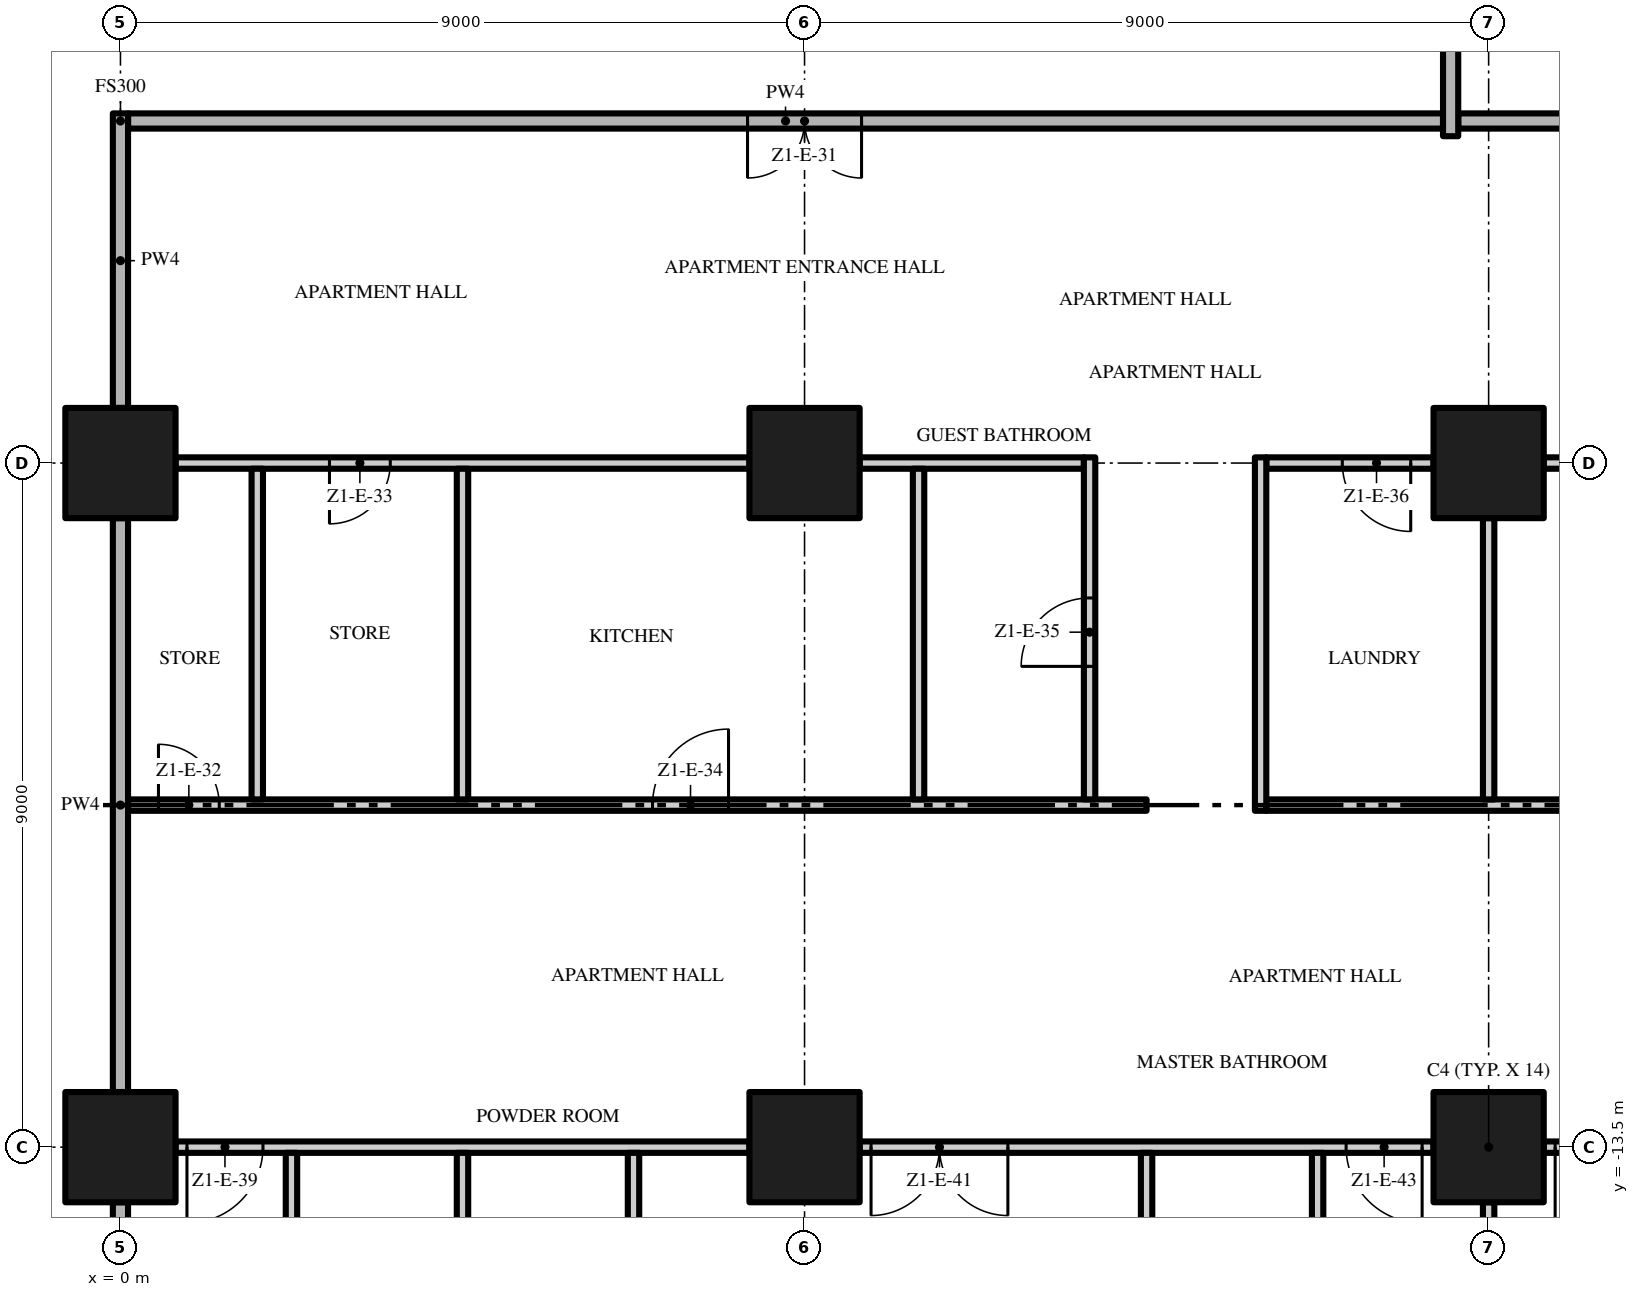
"""IFC4 building model, lengths in metres.
Left out: names, types, materials, properties, quantities, classifications, styles, units other than length and angle.
Written with IfcOpenShell. Run it as: python <this file> out.ifc"""

import sys

from ifc_helpers import new_model, si_unit, direction, frame, frame_2d, origin, origin_2d, place, context, subcontext, project, spatial, rectangle, extrude, element, fill, save


model = new_model("IFC4")
c1 = context("Model", 3, precision=1e-05, world=origin(), true_north=direction((0.0, 1.0)))
c2 = subcontext(c1, "Body", "Model", "MODEL_VIEW")
j1 = project(units=[si_unit("LENGTHUNIT", "METRE"), si_unit("PLANEANGLEUNIT", "RADIAN")], contexts=[c1])
p1 = place(None, origin())
s1 = spatial("IfcSite", under=j1, at=p1, CompositionType="ELEMENT")
p2 = place(p1, origin())
s2 = spatial("IfcBuilding", under=s1, at=p2, CompositionType="ELEMENT")
p3 = place(p2, frame((0.0, 0.0, 60.6)))
s3 = spatial("IfcBuildingStorey", under=s2, at=p3, CompositionType="ELEMENT", Elevation=60.6)
for number, where, z_axis, x_axis in (
    (1, (0.0, -13.5, 0.0), (0.0, 0.0, 1.0), (1.0, 0.0, 0.0)),
    (2, (0.0, -4.5, 0.0), (0.0, 0.0, 1.0), (1.0, 0.0, 0.0)),
    (3, (18.0, -13.5, 0.0), (0.0, 0.0, 1.0), (1.0, 0.0, 0.0)),
    (4, (18.0, -4.5, 0.0), (0.0, 0.0, 1.0), (1.0, 0.0, 0.0)),
    (5, (9.0, -13.5, 0.0), (0.0, 0.0, 1.0), (1.0, 0.0, 0.0)),
    (6, (9.0, -4.5, 0.0), (0.0, 0.0, 1.0), (1.0, 0.0, 0.0)),
):
    element("IfcColumn", number, at=place(p3, frame(where, z_axis=z_axis, x_axis=x_axis)), inside=s3, PredefinedType="COLUMN", context=c2, shape_type="SweptSolid", body=[
        extrude(rectangle(XDim=1.45, YDim=1.45, at=origin_2d()), origin(), (0.0, 0.0, 1.0), 3.5),
    ])
p4 = place(p3, frame((8.275, -13.5, 0.0), z_axis=(0.0, 0.0, 1.0), x_axis=(-1.0, 0.0, 0.0)))
e7 = element("IfcWall", 7, at=p4, inside=s3, PredefinedType="PARTITIONING", context=c2, shape_type="SweptSolid", body=[
    extrude(rectangle(XDim=7.55, YDim=0.15, at=frame_2d((3.775, 0.0))), origin(), (0.0, 0.0, 1.0), 3.5),
])
p5 = place(p4, frame((6.4, 0.0, 0.0)))
e8 = element("IfcOpeningElement", 8, at=p5, cuts=e7, PredefinedType="OPENING", context=c2, shape_type="SweptSolid", body=[
    extrude(rectangle(XDim=1.0, YDim=2.4, at=frame_2d((0.5, 1.2))), frame((0.0, 0.085, 0.0), z_axis=(0.0, -1.0, 0.0), x_axis=(1.0, 0.0, 0.0)), (0.0, 0.0, 1.0), 0.17),
])
p6 = place(p3, frame((17.275, -13.5, 0.0), z_axis=(0.0, 0.0, 1.0), x_axis=(-1.0, 0.0, 0.0)))
e9 = element("IfcWall", 9, at=p6, inside=s3, PredefinedType="PARTITIONING", context=c2, shape_type="SweptSolid", body=[
    extrude(rectangle(XDim=7.55, YDim=0.15, at=frame_2d((3.775, 0.0))), origin(), (0.0, 0.0, 1.0), 3.5),
])
p7 = place(p6, frame((5.6, 0.0, 0.0)))
e10 = element("IfcOpeningElement", 10, at=p7, cuts=e9, PredefinedType="OPENING", context=c2, shape_type="SweptSolid", body=[
    extrude(rectangle(XDim=1.8, YDim=2.4, at=frame_2d((0.9, 1.2))), frame((0.0, 0.085, 0.0), z_axis=(0.0, -1.0, 0.0), x_axis=(1.0, 0.0, 0.0)), (0.0, 0.0, 1.0), 0.17),
])
p8 = place(p6, frame((0.15, 0.0, 0.0)))
e11 = element("IfcOpeningElement", 11, at=p8, cuts=e9, PredefinedType="OPENING", context=c2, shape_type="SweptSolid", body=[
    extrude(rectangle(XDim=1.0, YDim=2.4, at=frame_2d((0.5, 1.2))), frame((0.0, 0.085, 0.0), z_axis=(0.0, -1.0, 0.0), x_axis=(1.0, 0.0, 0.0)), (0.0, 0.0, 1.0), 0.17),
])
p9 = place(p3, frame((25.65, -13.5, 0.0), z_axis=(0.0, 0.0, 1.0), x_axis=(-1.0, 0.0, 0.0)))
e12 = element("IfcWall", 12, at=p9, inside=s3, PredefinedType="PARTITIONING", context=c2, shape_type="SweptSolid", body=[
    extrude(rectangle(XDim=6.925, YDim=0.15, at=frame_2d((3.462, 0.0))), origin(), (0.0, 0.0, 1.0), 3.5),
])
p10 = place(p9, frame((5.775, 0.0, 0.0)))
e13 = element("IfcOpeningElement", 13, at=p10, cuts=e12, PredefinedType="OPENING", context=c2, shape_type="SweptSolid", body=[
    extrude(rectangle(XDim=1.0, YDim=2.4, at=frame_2d((0.5, 1.2))), frame((0.0, 0.085, 0.0), z_axis=(0.0, -1.0, 0.0), x_axis=(1.0, 0.0, 0.0)), (0.0, 0.0, 1.0), 0.17),
])
p11 = place(p9, frame((0.4, 0.0, 0.0)))
e14 = element("IfcOpeningElement", 14, at=p11, cuts=e12, PredefinedType="OPENING", context=c2, shape_type="SweptSolid", body=[
    extrude(rectangle(XDim=1.0, YDim=2.4, at=frame_2d((0.5, 1.2))), frame((0.0, 0.085, 0.0), z_axis=(0.0, -1.0, 0.0), x_axis=(1.0, 0.0, 0.0)), (0.0, 0.0, 1.0), 0.17),
])
p12 = place(p3, frame((0.1, -9.0, 0.0), z_axis=(0.0, 0.0, 1.0), x_axis=(1.0, 0.0, 0.0)))
e15 = element("IfcWall", 15, at=p12, inside=s3, PredefinedType="PARTITIONING", context=c2, shape_type="SweptSolid", body=[
    extrude(rectangle(XDim=13.4, YDim=0.15, at=frame_2d((6.7, 0.0))), origin(), (0.0, 0.0, 1.0), 3.5),
])
p13 = place(p12, frame((0.4, 0.0, 0.0)))
e16 = element("IfcOpeningElement", 16, at=p13, cuts=e15, PredefinedType="OPENING", context=c2, shape_type="SweptSolid", body=[
    extrude(rectangle(XDim=0.8, YDim=2.0, at=frame_2d((0.4, 1.0))), frame((0.0, 0.085, 0.0), z_axis=(0.0, -1.0, 0.0), x_axis=(1.0, 0.0, 0.0)), (0.0, 0.0, 1.0), 0.17),
])
p14 = place(p12, frame((6.9, 0.0, 0.0)))
e17 = element("IfcOpeningElement", 17, at=p14, cuts=e15, PredefinedType="OPENING", context=c2, shape_type="SweptSolid", body=[
    extrude(rectangle(XDim=1.0, YDim=2.4, at=frame_2d((0.5, 1.2))), frame((0.0, 0.085, 0.0), z_axis=(0.0, -1.0, 0.0), x_axis=(1.0, 0.0, 0.0)), (0.0, 0.0, 1.0), 0.17),
])
p15 = place(p3, frame((15.075, -9.0, 0.0), z_axis=(0.0, 0.0, 1.0), x_axis=(1.0, 0.0, 0.0)))
e18 = element("IfcWall", 18, at=p15, inside=s3, PredefinedType="PARTITIONING", context=c2, shape_type="SweptSolid", body=[
    extrude(rectangle(XDim=11.625, YDim=0.15, at=frame_2d((5.812, 0.0))), origin(), (0.0, 0.0, 1.0), 3.5),
])
p16 = place(p3, frame((8.275, -4.5, 0.0), z_axis=(0.0, 0.0, 1.0), x_axis=(-1.0, 0.0, 0.0)))
e19 = element("IfcWall", 19, at=p16, inside=s3, PredefinedType="PARTITIONING", context=c2, shape_type="SweptSolid", body=[
    extrude(rectangle(XDim=7.55, YDim=0.15, at=frame_2d((3.775, 0.0))), origin(), (0.0, 0.0, 1.0), 3.5),
])
p17 = place(p16, frame((4.725, 0.0, 0.0)))
e20 = element("IfcOpeningElement", 20, at=p17, cuts=e19, PredefinedType="OPENING", context=c2, shape_type="SweptSolid", body=[
    extrude(rectangle(XDim=0.8, YDim=2.0, at=frame_2d((0.4, 1.0))), frame((0.0, 0.085, 0.0), z_axis=(0.0, -1.0, 0.0), x_axis=(1.0, 0.0, 0.0)), (0.0, 0.0, 1.0), 0.17),
])
p18 = place(p3, frame((9.725, -4.5, 0.0), z_axis=(0.0, 0.0, 1.0), x_axis=(1.0, 0.0, 0.0)))
e21 = element("IfcWall", 21, at=p18, inside=s3, PredefinedType="PARTITIONING", context=c2, shape_type="SweptSolid", body=[
    extrude(rectangle(XDim=2.95, YDim=0.15, at=frame_2d((1.475, 0.0))), origin(), (0.0, 0.0, 1.0), 3.5),
])
p19 = place(p3, frame((17.275, -4.5, 0.0), z_axis=(0.0, 0.0, 1.0), x_axis=(-1.0, 0.0, 0.0)))
e22 = element("IfcWall", 22, at=p19, inside=s3, PredefinedType="PARTITIONING", context=c2, shape_type="SweptSolid", body=[
    extrude(rectangle(XDim=2.2, YDim=0.15, at=frame_2d((1.1, 0.0))), origin(), (0.0, 0.0, 1.0), 3.5),
])
p20 = place(p19, frame((0.3, 0.0, 0.0)))
e23 = element("IfcOpeningElement", 23, at=p20, cuts=e22, PredefinedType="OPENING", context=c2, shape_type="SweptSolid", body=[
    extrude(rectangle(XDim=0.9, YDim=2.1, at=frame_2d((0.45, 1.05))), frame((0.0, 0.085, 0.0), z_axis=(0.0, -1.0, 0.0), x_axis=(1.0, 0.0, 0.0)), (0.0, 0.0, 1.0), 0.17),
])
p21 = place(p3, frame((25.65, -4.5, 0.0), z_axis=(0.0, 0.0, 1.0), x_axis=(-1.0, 0.0, 0.0)))
e24 = element("IfcWall", 24, at=p21, inside=s3, PredefinedType="PARTITIONING", context=c2, shape_type="SweptSolid", body=[
    extrude(rectangle(XDim=6.925, YDim=0.15, at=frame_2d((3.462, 0.0))), origin(), (0.0, 0.0, 1.0), 3.5),
])
p22 = place(p21, frame((4.575, 0.0, 0.0)))
e25 = element("IfcOpeningElement", 25, at=p22, cuts=e24, PredefinedType="OPENING", context=c2, shape_type="SweptSolid", body=[
    extrude(rectangle(XDim=0.9, YDim=2.1, at=frame_2d((0.45, 1.05))), frame((0.0, 0.085, 0.0), z_axis=(0.0, -1.0, 0.0), x_axis=(1.0, 0.0, 0.0)), (0.0, 0.0, 1.0), 0.17),
])
p23 = place(p3, frame((17.4, 0.0, 0.0), z_axis=(0.0, 0.0, 1.0), x_axis=(-1.0, 0.0, 0.0)))
e26 = element("IfcWall", 26, at=p23, inside=s3, PredefinedType="PARTITIONING", context=c2, shape_type="SweptSolid", body=[
    extrude(rectangle(XDim=17.3, YDim=0.2, at=frame_2d((8.65, 0.0))), origin(), (0.0, 0.0, 1.0), 3.5),
])
p24 = place(p23, frame((7.65, 0.0, 0.0)))
e27 = element("IfcOpeningElement", 27, at=p24, cuts=e26, PredefinedType="OPENING", context=c2, shape_type="SweptSolid", body=[
    extrude(rectangle(XDim=1.5, YDim=2.4, at=frame_2d((0.75, 1.2))), frame((0.0, 0.11, 0.0), z_axis=(0.0, -1.0, 0.0), x_axis=(1.0, 0.0, 0.0)), (0.0, 0.0, 1.0), 0.22),
])
p25 = place(p3, frame((17.6, 0.0, 0.0), z_axis=(0.0, 0.0, 1.0), x_axis=(1.0, 0.0, 0.0)))
e28 = element("IfcWall", 28, at=p25, inside=s3, PredefinedType="PARTITIONING", context=c2, shape_type="SweptSolid", body=[
    extrude(rectangle(XDim=9.1, YDim=0.2, at=frame_2d((4.55, 0.0))), origin(), (0.0, 0.0, 1.0), 3.5),
])
p26 = place(p3, frame((0.0, -21.15, 0.0), z_axis=(0.0, 0.0, 1.0), x_axis=(0.0, 1.0, 0.0)))
e29 = element("IfcWall", 29, at=p26, inside=s3, PredefinedType="PARTITIONING", context=c2, shape_type="SweptSolid", body=[
    extrude(rectangle(XDim=6.925, YDim=0.2, at=frame_2d((3.462, 0.0))), origin(), (0.0, 0.0, 1.0), 3.5),
])
p27 = place(p3, frame((0.0, -12.775, 0.0), z_axis=(0.0, 0.0, 1.0), x_axis=(0.0, 1.0, 0.0)))
e30 = element("IfcWall", 30, at=p27, inside=s3, PredefinedType="PARTITIONING", context=c2, shape_type="SweptSolid", body=[
    extrude(rectangle(XDim=7.55, YDim=0.2, at=frame_2d((3.775, 0.0))), origin(), (0.0, 0.0, 1.0), 3.5),
])
p28 = place(p3, frame((0.0, -3.775, 0.0), z_axis=(0.0, 0.0, 1.0), x_axis=(0.0, 1.0, 0.0)))
e31 = element("IfcWall", 31, at=p28, inside=s3, PredefinedType="PARTITIONING", context=c2, shape_type="SweptSolid", body=[
    extrude(rectangle(XDim=3.875, YDim=0.2, at=frame_2d((1.938, 0.0))), origin(), (0.0, 0.0, 1.0), 3.5),
])
p29 = place(p3, frame((1.8, -8.925, 0.0), z_axis=(0.0, 0.0, 1.0), x_axis=(0.0, 1.0, 0.0)))
e32 = element("IfcWall", 32, at=p29, inside=s3, PredefinedType="PARTITIONING", context=c2, shape_type="SweptSolid", body=[
    extrude(rectangle(XDim=4.35, YDim=0.15, at=frame_2d((2.175, 0.0))), origin(), (0.0, 0.0, 1.0), 3.5),
])
p30 = place(p3, frame((2.25, -16.575, 0.0), z_axis=(0.0, 0.0, 1.0), x_axis=(0.0, 1.0, 0.0)))
e33 = element("IfcWall", 33, at=p30, inside=s3, PredefinedType="PARTITIONING", context=c2, shape_type="SweptSolid", body=[
    extrude(rectangle(XDim=3.0, YDim=0.15, at=frame_2d((1.5, 0.0))), origin(), (0.0, 0.0, 1.0), 3.5),
])
p31 = place(p3, frame((4.5, -22.2, 0.0), z_axis=(0.0, 0.0, 1.0), x_axis=(0.0, 1.0, 0.0)))
e34 = element("IfcWall", 34, at=p31, inside=s3, PredefinedType="PARTITIONING", context=c2, shape_type="SweptSolid", body=[
    extrude(rectangle(XDim=8.625, YDim=0.15, at=frame_2d((4.312, 0.0))), origin(), (0.0, 0.0, 1.0), 3.5),
])
p32 = place(p3, frame((4.5, -8.925, 0.0), z_axis=(0.0, 0.0, 1.0), x_axis=(0.0, 1.0, 0.0)))
e35 = element("IfcWall", 35, at=p32, inside=s3, PredefinedType="PARTITIONING", context=c2, shape_type="SweptSolid", body=[
    extrude(rectangle(XDim=4.35, YDim=0.15, at=frame_2d((2.175, 0.0))), origin(), (0.0, 0.0, 1.0), 3.5),
])
p33 = place(p3, frame((6.75, -16.575, 0.0), z_axis=(0.0, 0.0, 1.0), x_axis=(0.0, 1.0, 0.0)))
e36 = element("IfcWall", 36, at=p33, inside=s3, PredefinedType="PARTITIONING", context=c2, shape_type="SweptSolid", body=[
    extrude(rectangle(XDim=3.0, YDim=0.15, at=frame_2d((1.5, 0.0))), origin(), (0.0, 0.0, 1.0), 3.5),
])
p34 = place(p3, frame((10.5, -8.925, 0.0), z_axis=(0.0, 0.0, 1.0), x_axis=(0.0, 1.0, 0.0)))
e37 = element("IfcWall", 37, at=p34, inside=s3, PredefinedType="PARTITIONING", context=c2, shape_type="SweptSolid", body=[
    extrude(rectangle(XDim=4.35, YDim=0.15, at=frame_2d((2.175, 0.0))), origin(), (0.0, 0.0, 1.0), 3.5),
])
p35 = place(p3, frame((12.75, -8.925, 0.0), z_axis=(0.0, 0.0, 1.0), x_axis=(0.0, 1.0, 0.0)))
e38 = element("IfcWall", 38, at=p35, inside=s3, PredefinedType="PARTITIONING", context=c2, shape_type="SweptSolid", body=[
    extrude(rectangle(XDim=4.5, YDim=0.15, at=frame_2d((2.25, 0.0))), origin(), (0.0, 0.0, 1.0), 3.5),
])
p36 = place(p35, frame((1.75, 0.0, 0.0)))
e39 = element("IfcOpeningElement", 39, at=p36, cuts=e38, PredefinedType="OPENING", context=c2, shape_type="SweptSolid", body=[
    extrude(rectangle(XDim=0.9, YDim=2.1, at=frame_2d((0.45, 1.05))), frame((0.0, 0.085, 0.0), z_axis=(0.0, -1.0, 0.0), x_axis=(1.0, 0.0, 0.0)), (0.0, 0.0, 1.0), 0.17),
])
p37 = place(p3, frame((13.5, -22.2, 0.0), z_axis=(0.0, 0.0, 1.0), x_axis=(0.0, 1.0, 0.0)))
e40 = element("IfcWall", 40, at=p37, inside=s3, PredefinedType="PARTITIONING", context=c2, shape_type="SweptSolid", body=[
    extrude(rectangle(XDim=8.625, YDim=0.15, at=frame_2d((4.312, 0.0))), origin(), (0.0, 0.0, 1.0), 3.5),
])
p38 = place(p3, frame((15.0, -9.075, 0.0), z_axis=(0.0, 0.0, 1.0), x_axis=(0.0, 1.0, 0.0)))
e41 = element("IfcWall", 41, at=p38, inside=s3, PredefinedType="PARTITIONING", context=c2, shape_type="SweptSolid", body=[
    extrude(rectangle(XDim=4.65, YDim=0.15, at=frame_2d((2.325, 0.0))), origin(), (0.0, 0.0, 1.0), 3.5),
])
p39 = place(p3, frame((15.75, -16.575, 0.0), z_axis=(0.0, 0.0, 1.0), x_axis=(0.0, 1.0, 0.0)))
e42 = element("IfcWall", 42, at=p39, inside=s3, PredefinedType="PARTITIONING", context=c2, shape_type="SweptSolid", body=[
    extrude(rectangle(XDim=3.0, YDim=0.15, at=frame_2d((1.5, 0.0))), origin(), (0.0, 0.0, 1.0), 3.5),
])
p40 = place(p3, frame((17.5, -0.2, 0.0), z_axis=(0.0, 0.0, 1.0), x_axis=(0.0, 1.0, 0.0)))
e43 = element("IfcWall", 43, at=p40, inside=s3, PredefinedType="PARTITIONING", context=c2, shape_type="SweptSolid", body=[
    extrude(rectangle(XDim=3.975, YDim=0.2, at=frame_2d((1.988, 0.0))), origin(), (0.0, 0.0, 1.0), 3.5),
])
p41 = place(p3, frame((18.0, -21.15, 0.0), z_axis=(0.0, 0.0, 1.0), x_axis=(0.0, 1.0, 0.0)))
e44 = element("IfcWall", 44, at=p41, inside=s3, PredefinedType="PARTITIONING", context=c2, shape_type="SweptSolid", body=[
    extrude(rectangle(XDim=6.925, YDim=0.15, at=frame_2d((3.462, 0.0))), origin(), (0.0, 0.0, 1.0), 3.5),
])
p42 = place(p3, frame((18.0, -8.925, 0.0), z_axis=(0.0, 0.0, 1.0), x_axis=(0.0, 1.0, 0.0)))
e45 = element("IfcWall", 45, at=p42, inside=s3, PredefinedType="PARTITIONING", context=c2, shape_type="SweptSolid", body=[
    extrude(rectangle(XDim=3.7, YDim=0.15, at=frame_2d((1.85, 0.0))), origin(), (0.0, 0.0, 1.0), 3.5),
])
p43 = place(p24, origin())
e46 = element("IfcDoor", 46, at=p43, inside=s3, OperationType="DOUBLE_DOOR_SINGLE_SWING", PredefinedType="DOOR", context=c2, shape_type="SweptSolid", body=[
    extrude(rectangle(XDim=1.5, YDim=2.4, at=frame_2d((0.75, 1.2))), frame((0.0, 0.025, 0.0), z_axis=(0.0, -1.0, 0.0), x_axis=(1.0, 0.0, 0.0)), (0.0, 0.0, 1.0), 0.05),
])
fill(e27, e46)
p44 = place(p13, origin())
e47 = element("IfcDoor", 47, at=p44, inside=s3, OperationType="SINGLE_SWING_LEFT", PredefinedType="DOOR", context=c2, shape_type="SweptSolid", body=[
    extrude(rectangle(XDim=0.8, YDim=2.0, at=frame_2d((0.4, 1.0))), frame((0.0, 0.025, 0.0), z_axis=(0.0, -1.0, 0.0), x_axis=(1.0, 0.0, 0.0)), (0.0, 0.0, 1.0), 0.05),
])
fill(e16, e47)
p45 = place(p17, origin())
e48 = element("IfcDoor", 48, at=p45, inside=s3, OperationType="SINGLE_SWING_RIGHT", PredefinedType="DOOR", context=c2, shape_type="SweptSolid", body=[
    extrude(rectangle(XDim=0.8, YDim=2.0, at=frame_2d((0.4, 1.0))), frame((0.0, 0.025, 0.0), z_axis=(0.0, -1.0, 0.0), x_axis=(1.0, 0.0, 0.0)), (0.0, 0.0, 1.0), 0.05),
])
fill(e20, e48)
p46 = place(p14, origin())
e49 = element("IfcDoor", 49, at=p46, inside=s3, OperationType="SINGLE_SWING_RIGHT", PredefinedType="DOOR", context=c2, shape_type="SweptSolid", body=[
    extrude(rectangle(XDim=1.0, YDim=2.4, at=frame_2d((0.5, 1.2))), frame((0.0, 0.025, 0.0), z_axis=(0.0, -1.0, 0.0), x_axis=(1.0, 0.0, 0.0)), (0.0, 0.0, 1.0), 0.05),
])
fill(e17, e49)
p47 = place(p36, origin())
e50 = element("IfcDoor", 50, at=p47, inside=s3, OperationType="SINGLE_SWING_LEFT", PredefinedType="DOOR", context=c2, shape_type="SweptSolid", body=[
    extrude(rectangle(XDim=0.9, YDim=2.1, at=frame_2d((0.45, 1.05))), frame((0.0, 0.025, 0.0), z_axis=(0.0, -1.0, 0.0), x_axis=(1.0, 0.0, 0.0)), (0.0, 0.0, 1.0), 0.05),
])
fill(e39, e50)
p48 = place(p20, origin())
e51 = element("IfcDoor", 51, at=p48, inside=s3, OperationType="SINGLE_SWING_LEFT", PredefinedType="DOOR", context=c2, shape_type="SweptSolid", body=[
    extrude(rectangle(XDim=0.9, YDim=2.1, at=frame_2d((0.45, 1.05))), frame((0.0, 0.025, 0.0), z_axis=(0.0, -1.0, 0.0), x_axis=(1.0, 0.0, 0.0)), (0.0, 0.0, 1.0), 0.05),
])
fill(e23, e51)
p49 = place(p5, origin())
e52 = element("IfcDoor", 52, at=p49, inside=s3, OperationType="SINGLE_SWING_RIGHT", PredefinedType="DOOR", context=c2, shape_type="SweptSolid", body=[
    extrude(rectangle(XDim=1.0, YDim=2.4, at=frame_2d((0.5, 1.2))), frame((0.0, 0.025, 0.0), z_axis=(0.0, -1.0, 0.0), x_axis=(1.0, 0.0, 0.0)), (0.0, 0.0, 1.0), 0.05),
])
fill(e8, e52)
p50 = place(p7, origin())
e53 = element("IfcDoor", 53, at=p50, inside=s3, OperationType="DOUBLE_DOOR_SINGLE_SWING", PredefinedType="DOOR", context=c2, shape_type="SweptSolid", body=[
    extrude(rectangle(XDim=1.8, YDim=2.4, at=frame_2d((0.9, 1.2))), frame((0.0, 0.025, 0.0), z_axis=(0.0, -1.0, 0.0), x_axis=(1.0, 0.0, 0.0)), (0.0, 0.0, 1.0), 0.05),
])
fill(e10, e53)
p51 = place(p8, origin())
e54 = element("IfcDoor", 54, at=p51, inside=s3, OperationType="SINGLE_SWING_LEFT", PredefinedType="DOOR", context=c2, shape_type="SweptSolid", body=[
    extrude(rectangle(XDim=1.0, YDim=2.4, at=frame_2d((0.5, 1.2))), frame((0.0, 0.025, 0.0), z_axis=(0.0, -1.0, 0.0), x_axis=(1.0, 0.0, 0.0)), (0.0, 0.0, 1.0), 0.05),
])
fill(e11, e54)
p52 = place(p10, origin())
e55 = element("IfcDoor", 55, at=p52, inside=s3, OperationType="SINGLE_SWING_RIGHT", PredefinedType="DOOR", context=c2, shape_type="SweptSolid", body=[
    extrude(rectangle(XDim=1.0, YDim=2.4, at=frame_2d((0.5, 1.2))), frame((0.0, 0.025, 0.0), z_axis=(0.0, -1.0, 0.0), x_axis=(1.0, 0.0, 0.0)), (0.0, 0.0, 1.0), 0.05),
])
fill(e13, e55)
save(model, sys.argv[1])
